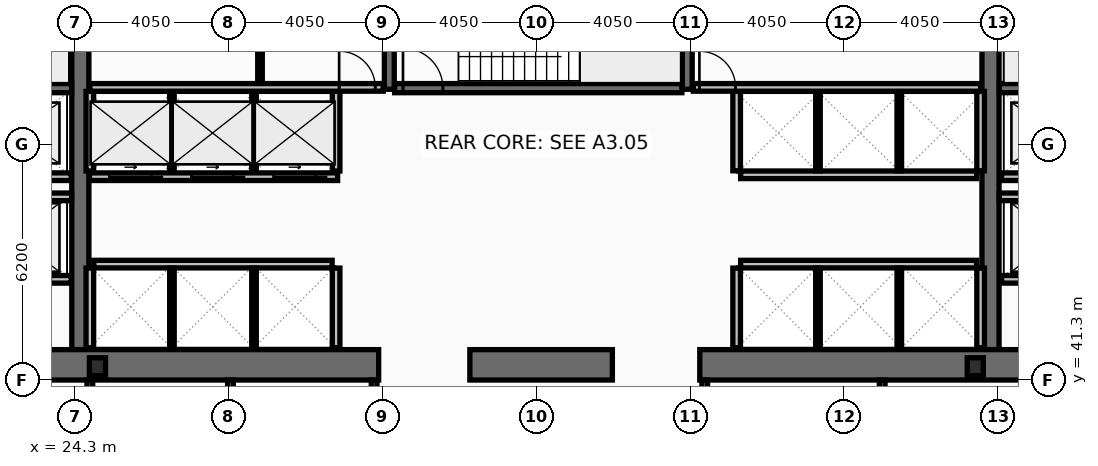
"""IFC4 building model, lengths in metres.
Left out: names, types, materials, properties, quantities, classifications, styles, units other than length and angle.
Written with IfcOpenShell. Run it as: python <this file> out.ifc"""

import sys

from ifc_helpers import new_model, si_unit, direction, frame, frame_2d, origin, origin_2d, place, context, subcontext, project, spatial, rectangle, i_section, extrude, element, fill, save


model = new_model("IFC4")
c1 = context("Model", 3, precision=1e-05, world=origin(), true_north=direction((0.0, 1.0)))
c2 = subcontext(c1, "Body", "Model", "MODEL_VIEW")
j1 = project(units=[si_unit("LENGTHUNIT", "METRE"), si_unit("PLANEANGLEUNIT", "RADIAN")], contexts=[c1])
p1 = place(None, origin())
s1 = spatial("IfcSite", under=j1, at=p1, CompositionType="ELEMENT")
p2 = place(p1, origin())
s2 = spatial("IfcBuilding", under=s1, at=p2, CompositionType="ELEMENT")
p3 = place(p2, frame((0.0, 0.0, 37.8)))
s3 = spatial("IfcBuildingStorey", under=s2, at=p3, CompositionType="ELEMENT", Elevation=37.8)
for number, where, z_axis, x_axis in (
    (1, (24.45, 42.1, 0.0), (0.0, 0.0, 1.0), (0.0, 1.0, 0.0)),
    (2, (48.4, 42.1, 0.0), (0.0, 0.0, 1.0), (0.0, 1.0, 0.0)),
):
    element("IfcWall", number, at=place(p3, frame(where, z_axis=z_axis, x_axis=x_axis)), inside=s3, PredefinedType="SHEAR", context=c2, shape_type="SweptSolid", body=[
        extrude(rectangle(XDim=10.8, YDim=0.45, at=frame_2d((5.4, 0.0))), origin(), (0.0, 0.0, 1.0), 3.82),
    ])
p4 = place(p3, frame((32.3, 41.7, 0.0), z_axis=(0.0, 0.0, 1.0), x_axis=(-1.0, 0.0, 0.0)))
e3 = element("IfcWall", 3, at=p4, inside=s3, PredefinedType="SHEAR", context=c2, shape_type="SweptSolid", body=[
    extrude(rectangle(XDim=11.45, YDim=0.8, at=frame_2d((5.725, 0.0))), origin(), (0.0, 0.0, 1.0), 3.82),
])
p5 = place(p3, frame((38.45, 41.7, 0.0), z_axis=(0.0, 0.0, 1.0), x_axis=(-1.0, 0.0, 0.0)))
e4 = element("IfcWall", 4, at=p5, inside=s3, PredefinedType="SHEAR", context=c2, shape_type="SweptSolid", body=[
    extrude(rectangle(XDim=3.75, YDim=0.8, at=frame_2d((1.875, 0.0))), origin(), (0.0, 0.0, 1.0), 3.82),
])
p6 = place(p3, frame((52.05, 41.7, 0.0), z_axis=(0.0, 0.0, 1.0), x_axis=(-1.0, 0.0, 0.0)))
e5 = element("IfcWall", 5, at=p6, inside=s3, PredefinedType="SHEAR", context=c2, shape_type="SweptSolid", body=[
    extrude(rectangle(XDim=11.3, YDim=0.8, at=frame_2d((5.65, 0.0))), origin(), (0.0, 0.0, 1.0), 3.82),
])
for number, where, z_axis, x_axis in (
    (6, (32.58, 48.95, 0.0), (0.0, 0.0, 1.0), (0.0, 1.0, 0.0)),
    (7, (40.42, 48.95, 0.0), (0.0, 0.0, 1.0), (0.0, 1.0, 0.0)),
):
    element("IfcWall", number, at=place(p3, frame(where, z_axis=z_axis, x_axis=x_axis)), inside=s3, PredefinedType="SHEAR", context=c2, shape_type="SweptSolid", body=[
        extrude(rectangle(XDim=3.95, YDim=0.26, at=frame_2d((1.975, 0.0))), origin(), (0.0, 0.0, 1.0), 3.82),
    ])
p7 = place(p3, frame((17.0, 48.98, 0.0), z_axis=(0.0, 0.0, 1.0), x_axis=(1.0, 0.0, 0.0)))
e8 = element("IfcWall", 8, at=p7, inside=s3, PredefinedType="SHEAR", context=c2, shape_type="SweptSolid", body=[
    extrude(rectangle(XDim=7.22, YDim=0.24, at=frame_2d((3.61, 0.0))), origin(), (0.0, 0.0, 1.0), 3.82),
])
p8 = place(p7, frame((0.22, 0.0, 0.0)))
e9 = element("IfcOpeningElement", 9, at=p8, cuts=e8, PredefinedType="OPENING", context=c2, shape_type="SweptSolid", body=[
    extrude(rectangle(XDim=1.05, YDim=2.15, at=frame_2d((0.525, 1.075))), frame((0.0, 0.13, 0.0), z_axis=(0.0, -1.0, 0.0), x_axis=(1.0, 0.0, 0.0)), (0.0, 0.0, 1.0), 0.26),
])
p9 = place(p3, frame((48.63, 48.98, 0.0), z_axis=(0.0, 0.0, 1.0), x_axis=(1.0, 0.0, 0.0)))
e10 = element("IfcWall", 10, at=p9, inside=s3, PredefinedType="SHEAR", context=c2, shape_type="SweptSolid", body=[
    extrude(rectangle(XDim=7.27, YDim=0.24, at=frame_2d((3.635, 0.0))), origin(), (0.0, 0.0, 1.0), 3.82),
])
p10 = place(p9, frame((6.0, 0.0, 0.0)))
e11 = element("IfcOpeningElement", 11, at=p10, cuts=e10, PredefinedType="OPENING", context=c2, shape_type="SweptSolid", body=[
    extrude(rectangle(XDim=1.05, YDim=2.15, at=frame_2d((0.525, 1.075))), frame((0.0, 0.13, 0.0), z_axis=(0.0, -1.0, 0.0), x_axis=(1.0, 0.0, 0.0)), (0.0, 0.0, 1.0), 0.26),
])
p11 = place(p3, frame((32.72, 48.98, 0.0), z_axis=(0.0, 0.0, 1.0), x_axis=(1.0, 0.0, 0.0)))
e12 = element("IfcWall", 12, at=p11, inside=s3, PredefinedType="SHEAR", context=c2, shape_type="SweptSolid", body=[
    extrude(rectangle(XDim=7.56, YDim=0.24, at=frame_2d((3.78, 0.0))), origin(), (0.0, 0.0, 1.0), 3.82),
])
p12 = place(p11, frame((0.22, 0.0, 0.0)))
e13 = element("IfcOpeningElement", 13, at=p12, cuts=e12, PredefinedType="OPENING", context=c2, shape_type="SweptSolid", body=[
    extrude(rectangle(XDim=1.05, YDim=2.15, at=frame_2d((0.525, 1.075))), frame((0.0, 0.13, 0.0), z_axis=(0.0, -1.0, 0.0), x_axis=(1.0, 0.0, 0.0)), (0.0, 0.0, 1.0), 0.26),
])
for number, where, z_axis, x_axis in (
    (14, (24.9, 41.65, 0.0), (0.0, 0.0, 1.0), (1.0, 0.0, 0.0)),
    (15, (48.0, 41.65, 0.0), (0.0, 0.0, 1.0), (1.0, 0.0, 0.0)),
):
    element("IfcColumn", number, at=place(p3, frame(where, z_axis=z_axis, x_axis=x_axis)), inside=s3, PredefinedType="COLUMN", context=c2, shape_type="SweptSolid", body=[
        extrude(i_section(OverallWidth=0.424, OverallDepth=0.474, WebThickness=0.048, FlangeThickness=0.077, at=origin_2d()), origin(), (0.0, 0.0, 1.0), 4.0),
    ])
p13 = place(p3, frame((51.61, 43.95, 0.0), z_axis=(0.0, 0.0, 1.0), x_axis=(-1.0, 0.0, 0.0)))
e16 = element("IfcWall", 16, at=p13, inside=s3, PredefinedType="PARTITIONING", context=c2, shape_type="SweptSolid", body=[
    extrude(rectangle(XDim=2.92, YDim=0.2, at=frame_2d((1.46, 0.0))), origin(), (0.0, 0.0, 1.0), 3.82),
])
p14 = place(p13, frame((0.81, 0.0, 0.0)))
e17 = element("IfcOpeningElement", 17, at=p14, cuts=e16, PredefinedType="OPENING", context=c2, shape_type="SweptSolid", body=[
    extrude(rectangle(XDim=1.3, YDim=2.18, at=frame_2d((0.65, 1.09))), frame((0.0, 0.11, 0.0), z_axis=(0.0, -1.0, 0.0), x_axis=(1.0, 0.0, 0.0)), (0.0, 0.0, 1.0), 0.22),
])
p15 = place(p3, frame((24.21, 43.95, 0.0), z_axis=(0.0, 0.0, 1.0), x_axis=(-1.0, 0.0, 0.0)))
e18 = element("IfcWall", 18, at=p15, inside=s3, PredefinedType="PARTITIONING", context=c2, shape_type="SweptSolid", body=[
    extrude(rectangle(XDim=2.97, YDim=0.2, at=frame_2d((1.485, 0.0))), origin(), (0.0, 0.0, 1.0), 3.82),
])
p16 = place(p15, frame((0.86, 0.0, 0.0)))
e19 = element("IfcOpeningElement", 19, at=p16, cuts=e18, PredefinedType="OPENING", context=c2, shape_type="SweptSolid", body=[
    extrude(rectangle(XDim=1.3, YDim=2.18, at=frame_2d((0.65, 1.09))), frame((0.0, 0.11, 0.0), z_axis=(0.0, -1.0, 0.0), x_axis=(1.0, 0.0, 0.0)), (0.0, 0.0, 1.0), 0.22),
])
p17 = place(p3, frame((51.61, 46.65, 0.0), z_axis=(0.0, 0.0, 1.0), x_axis=(-1.0, 0.0, 0.0)))
e20 = element("IfcWall", 20, at=p17, inside=s3, PredefinedType="PARTITIONING", context=c2, shape_type="SweptSolid", body=[
    extrude(rectangle(XDim=2.92, YDim=0.2, at=frame_2d((1.46, 0.0))), origin(), (0.0, 0.0, 1.0), 3.82),
])
p18 = place(p17, frame((0.86, 0.0, 0.0)))
e21 = element("IfcOpeningElement", 21, at=p18, cuts=e20, PredefinedType="OPENING", context=c2, shape_type="SweptSolid", body=[
    extrude(rectangle(XDim=1.2, YDim=2.18, at=frame_2d((0.6, 1.09))), frame((0.0, 0.11, 0.0), z_axis=(0.0, -1.0, 0.0), x_axis=(1.0, 0.0, 0.0)), (0.0, 0.0, 1.0), 0.22),
])
p19 = place(p3, frame((24.21, 46.65, 0.0), z_axis=(0.0, 0.0, 1.0), x_axis=(-1.0, 0.0, 0.0)))
e22 = element("IfcWall", 22, at=p19, inside=s3, PredefinedType="PARTITIONING", context=c2, shape_type="SweptSolid", body=[
    extrude(rectangle(XDim=2.97, YDim=0.2, at=frame_2d((1.485, 0.0))), origin(), (0.0, 0.0, 1.0), 3.82),
])
p20 = place(p19, frame((0.91, 0.0, 0.0)))
e23 = element("IfcOpeningElement", 23, at=p20, cuts=e22, PredefinedType="OPENING", context=c2, shape_type="SweptSolid", body=[
    extrude(rectangle(XDim=1.2, YDim=2.18, at=frame_2d((0.6, 1.09))), frame((0.0, 0.11, 0.0), z_axis=(0.0, -1.0, 0.0), x_axis=(1.0, 0.0, 0.0)), (0.0, 0.0, 1.0), 0.22),
])
p21 = place(p3, frame((31.22, 46.65, 0.0), z_axis=(0.0, 0.0, 1.0), x_axis=(-1.0, 0.0, 0.0)))
e24 = element("IfcWall", 24, at=p21, inside=s3, PredefinedType="PARTITIONING", context=c2, shape_type="SweptSolid", body=[
    extrude(rectangle(XDim=6.53, YDim=0.2, at=frame_2d((3.265, 0.0))), origin(), (0.0, 0.0, 1.0), 3.82),
])
p22 = place(p21, frame((4.9, 0.0, 0.0)))
e25 = element("IfcOpeningElement", 25, at=p22, cuts=e24, PredefinedType="OPENING", context=c2, shape_type="SweptSolid", body=[
    extrude(rectangle(XDim=1.1, YDim=2.18, at=frame_2d((0.55, 1.09))), frame((0.0, 0.11, 0.0), z_axis=(0.0, -1.0, 0.0), x_axis=(1.0, 0.0, 0.0)), (0.0, 0.0, 1.0), 0.22),
])
p23 = place(p21, frame((2.74, 0.0, 0.0)))
e26 = element("IfcOpeningElement", 26, at=p23, cuts=e24, PredefinedType="OPENING", context=c2, shape_type="SweptSolid", body=[
    extrude(rectangle(XDim=1.1, YDim=2.18, at=frame_2d((0.55, 1.09))), frame((0.0, 0.11, 0.0), z_axis=(0.0, -1.0, 0.0), x_axis=(1.0, 0.0, 0.0)), (0.0, 0.0, 1.0), 0.22),
])
p24 = place(p21, frame((0.58, 0.0, 0.0)))
e27 = element("IfcOpeningElement", 27, at=p24, cuts=e24, PredefinedType="OPENING", context=c2, shape_type="SweptSolid", body=[
    extrude(rectangle(XDim=1.1, YDim=2.18, at=frame_2d((0.55, 1.09))), frame((0.0, 0.11, 0.0), z_axis=(0.0, -1.0, 0.0), x_axis=(1.0, 0.0, 0.0)), (0.0, 0.0, 1.0), 0.22),
])
p25 = place(p3, frame((21.2, 46.12, 0.0), z_axis=(0.0, 0.0, 1.0), x_axis=(1.0, 0.0, 0.0)))
e28 = element("IfcWall", 28, at=p25, inside=s3, PredefinedType="PARTITIONING", context=c2, shape_type="SweptSolid", body=[
    extrude(rectangle(XDim=3.02, YDim=0.2, at=frame_2d((1.51, 0.0))), origin(), (0.0, 0.0, 1.0), 3.82),
])
p26 = place(p3, frame((48.63, 46.12, 0.0), z_axis=(0.0, 0.0, 1.0), x_axis=(1.0, 0.0, 0.0)))
e29 = element("IfcWall", 29, at=p26, inside=s3, PredefinedType="PARTITIONING", context=c2, shape_type="SweptSolid", body=[
    extrude(rectangle(XDim=3.07, YDim=0.2, at=frame_2d((1.535, 0.0))), origin(), (0.0, 0.0, 1.0), 3.82),
])
for number, where, z_axis, x_axis in (
    (30, (24.7, 46.8, 0.0), (0.0, 0.0, 1.0), (0.0, 1.0, 0.0)),
    (31, (31.18, 46.8, 0.0), (0.0, 0.0, 1.0), (0.0, 1.0, 0.0)),
):
    element("IfcWall", number, at=place(p3, frame(where, z_axis=z_axis, x_axis=x_axis)), inside=s3, PredefinedType="PARTITIONING", context=c2, shape_type="SweptSolid", body=[
        extrude(rectangle(XDim=2.095, YDim=0.2, at=frame_2d((1.047, 0.0))), origin(), (0.0, 0.0, 1.0), 3.82),
    ])
for number, where, z_axis, x_axis in (
    (32, (26.86, 46.8, 0.0), (0.0, 0.0, 1.0), (0.0, 1.0, 0.0)),
    (33, (29.02, 46.8, 0.0), (0.0, 0.0, 1.0), (0.0, 1.0, 0.0)),
):
    element("IfcWall", number, at=place(p3, frame(where, z_axis=z_axis, x_axis=x_axis)), inside=s3, PredefinedType="PARTITIONING", context=c2, shape_type="SweptSolid", body=[
        extrude(rectangle(XDim=2.095, YDim=0.12, at=frame_2d((1.047, 0.0))), origin(), (0.0, 0.0, 1.0), 3.82),
    ])
p27 = place(p3, frame((24.805, 44.35, 0.0), z_axis=(0.0, 0.0, 1.0), x_axis=(1.0, 0.0, 0.0)))
e34 = element("IfcWall", 34, at=p27, inside=s3, PredefinedType="PARTITIONING", context=c2, shape_type="SweptSolid", body=[
    extrude(rectangle(XDim=6.27, YDim=0.2, at=frame_2d((3.135, 0.0))), origin(), (0.0, 0.0, 1.0), 3.82),
])
for number, where, z_axis, x_axis in (
    (35, (24.7, 42.15, 0.0), (0.0, 0.0, 1.0), (0.0, 1.0, 0.0)),
    (36, (31.18, 42.15, 0.0), (0.0, 0.0, 1.0), (0.0, 1.0, 0.0)),
):
    element("IfcWall", number, at=place(p3, frame(where, z_axis=z_axis, x_axis=x_axis)), inside=s3, PredefinedType="PARTITIONING", context=c2, shape_type="SweptSolid", body=[
        extrude(rectangle(XDim=2.095, YDim=0.2, at=frame_2d((1.048, 0.0))), origin(), (0.0, 0.0, 1.0), 3.82),
    ])
for number, where, z_axis, x_axis in (
    (37, (26.86, 42.15, 0.0), (0.0, 0.0, 1.0), (0.0, 1.0, 0.0)),
    (38, (29.02, 42.15, 0.0), (0.0, 0.0, 1.0), (0.0, 1.0, 0.0)),
):
    element("IfcWall", number, at=place(p3, frame(where, z_axis=z_axis, x_axis=x_axis)), inside=s3, PredefinedType="PARTITIONING", context=c2, shape_type="SweptSolid", body=[
        extrude(rectangle(XDim=2.095, YDim=0.12, at=frame_2d((1.048, 0.0))), origin(), (0.0, 0.0, 1.0), 3.82),
    ])
p28 = place(p3, frame((41.825, 46.7, 0.0), z_axis=(0.0, 0.0, 1.0), x_axis=(1.0, 0.0, 0.0)))
e39 = element("IfcWall", 39, at=p28, inside=s3, PredefinedType="PARTITIONING", context=c2, shape_type="SweptSolid", body=[
    extrude(rectangle(XDim=6.21, YDim=0.2, at=frame_2d((3.105, 0.0))), origin(), (0.0, 0.0, 1.0), 3.82),
])
for number, where, z_axis, x_axis in (
    (40, (41.72, 46.805, 0.0), (0.0, 0.0, 1.0), (0.0, 1.0, 0.0)),
    (41, (48.14, 46.805, 0.0), (0.0, 0.0, 1.0), (0.0, 1.0, 0.0)),
):
    element("IfcWall", number, at=place(p3, frame(where, z_axis=z_axis, x_axis=x_axis)), inside=s3, PredefinedType="PARTITIONING", context=c2, shape_type="SweptSolid", body=[
        extrude(rectangle(XDim=2.09, YDim=0.2, at=frame_2d((1.045, 0.0))), origin(), (0.0, 0.0, 1.0), 3.82),
    ])
for number, where, z_axis, x_axis in (
    (42, (43.86, 46.805, 0.0), (0.0, 0.0, 1.0), (0.0, 1.0, 0.0)),
    (43, (46.0, 46.805, 0.0), (0.0, 0.0, 1.0), (0.0, 1.0, 0.0)),
):
    element("IfcWall", number, at=place(p3, frame(where, z_axis=z_axis, x_axis=x_axis)), inside=s3, PredefinedType="PARTITIONING", context=c2, shape_type="SweptSolid", body=[
        extrude(rectangle(XDim=2.09, YDim=0.12, at=frame_2d((1.045, 0.0))), origin(), (0.0, 0.0, 1.0), 3.82),
    ])
p29 = place(p3, frame((41.825, 44.35, 0.0), z_axis=(0.0, 0.0, 1.0), x_axis=(1.0, 0.0, 0.0)))
e44 = element("IfcWall", 44, at=p29, inside=s3, PredefinedType="PARTITIONING", context=c2, shape_type="SweptSolid", body=[
    extrude(rectangle(XDim=6.21, YDim=0.2, at=frame_2d((3.105, 0.0))), origin(), (0.0, 0.0, 1.0), 3.82),
])
for number, where, z_axis, x_axis in (
    (45, (41.72, 42.15, 0.0), (0.0, 0.0, 1.0), (0.0, 1.0, 0.0)),
    (46, (48.14, 42.15, 0.0), (0.0, 0.0, 1.0), (0.0, 1.0, 0.0)),
):
    element("IfcWall", number, at=place(p3, frame(where, z_axis=z_axis, x_axis=x_axis)), inside=s3, PredefinedType="PARTITIONING", context=c2, shape_type="SweptSolid", body=[
        extrude(rectangle(XDim=2.095, YDim=0.2, at=frame_2d((1.048, 0.0))), origin(), (0.0, 0.0, 1.0), 3.82),
    ])
for number, where, z_axis, x_axis in (
    (47, (43.86, 42.15, 0.0), (0.0, 0.0, 1.0), (0.0, 1.0, 0.0)),
    (48, (46.0, 42.15, 0.0), (0.0, 0.0, 1.0), (0.0, 1.0, 0.0)),
):
    element("IfcWall", number, at=place(p3, frame(where, z_axis=z_axis, x_axis=x_axis)), inside=s3, PredefinedType="PARTITIONING", context=c2, shape_type="SweptSolid", body=[
        extrude(rectangle(XDim=2.095, YDim=0.12, at=frame_2d((1.048, 0.0))), origin(), (0.0, 0.0, 1.0), 3.82),
    ])
p30 = place(p3, frame((24.7, 49.0, 0.0), z_axis=(0.0, 0.0, 1.0), x_axis=(1.0, 0.0, 0.0)))
e49 = element("IfcWall", 49, at=p30, inside=s3, PredefinedType="PARTITIONING", context=c2, shape_type="SweptSolid", body=[
    extrude(rectangle(XDim=7.72, YDim=0.2, at=frame_2d((3.86, 0.0))), origin(), (0.0, 0.0, 1.0), 3.82),
])
p31 = place(p30, frame((6.56, 0.0, 0.0)))
e50 = element("IfcOpeningElement", 50, at=p31, cuts=e49, PredefinedType="OPENING", context=c2, shape_type="SweptSolid", body=[
    extrude(rectangle(XDim=0.95, YDim=2.1, at=frame_2d((0.475, 1.05))), frame((0.0, 0.11, 0.0), z_axis=(0.0, -1.0, 0.0), x_axis=(1.0, 0.0, 0.0)), (0.0, 0.0, 1.0), 0.22),
])
p32 = place(p3, frame((29.177, 49.105, 0.0), z_axis=(0.0, 0.0, 1.0), x_axis=(0.0, 1.0, 0.0)))
e51 = element("IfcWall", 51, at=p32, inside=s3, PredefinedType="PARTITIONING", context=c2, shape_type="SweptSolid", body=[
    extrude(rectangle(XDim=3.69, YDim=0.12, at=frame_2d((1.845, 0.0))), origin(), (0.0, 0.0, 1.0), 3.82),
])
p33 = place(p32, frame((1.05, 0.0, 0.0)))
e52 = element("IfcOpeningElement", 52, at=p33, cuts=e51, PredefinedType="OPENING", context=c2, shape_type="SweptSolid", body=[
    extrude(rectangle(XDim=0.9, YDim=2.05, at=frame_2d((0.45, 1.025))), frame((0.0, 0.07, 0.0), z_axis=(0.0, -1.0, 0.0), x_axis=(1.0, 0.0, 0.0)), (0.0, 0.0, 1.0), 0.14),
])
p34 = place(p3, frame((40.58, 49.0, 0.0), z_axis=(0.0, 0.0, 1.0), x_axis=(1.0, 0.0, 0.0)))
e53 = element("IfcWall", 53, at=p34, inside=s3, PredefinedType="PARTITIONING", context=c2, shape_type="SweptSolid", body=[
    extrude(rectangle(XDim=7.56, YDim=0.2, at=frame_2d((3.78, 0.0))), origin(), (0.0, 0.0, 1.0), 3.82),
])
p35 = place(p34, frame((0.16, 0.0, 0.0)))
e54 = element("IfcOpeningElement", 54, at=p35, cuts=e53, PredefinedType="OPENING", context=c2, shape_type="SweptSolid", body=[
    extrude(rectangle(XDim=0.95, YDim=2.1, at=frame_2d((0.475, 1.05))), frame((0.0, 0.11, 0.0), z_axis=(0.0, -1.0, 0.0), x_axis=(1.0, 0.0, 0.0)), (0.0, 0.0, 1.0), 0.22),
])
p36 = place(p3, frame((24.7, 38.28, 0.0), z_axis=(0.0, 0.0, 1.0), x_axis=(0.0, 1.0, 0.0)))
e55 = element("IfcWall", 55, at=p36, inside=s3, PredefinedType="PARTITIONING", context=c2, shape_type="SweptSolid", body=[
    extrude(rectangle(XDim=3.02, YDim=0.15, at=frame_2d((1.51, 0.0))), origin(), (0.0, 0.0, 1.0), 3.01),
])
for number, where, z_axis, x_axis in (
    (56, (28.4, 38.28, 0.0), (0.0, 0.0, 1.0), (0.0, 1.0, 0.0)),
    (57, (32.18, 38.28, 0.0), (0.0, 0.0, 1.0), (0.0, 1.0, 0.0)),
    (58, (40.88, 38.28, 0.0), (0.0, 0.0, 1.0), (0.0, 1.0, 0.0)),
    (59, (45.55, 38.28, 0.0), (0.0, 0.0, 1.0), (0.0, 1.0, 0.0)),
):
    element("IfcWall", number, at=place(p3, frame(where, z_axis=z_axis, x_axis=x_axis)), inside=s3, PredefinedType="PARTITIONING", context=c2, shape_type="SweptSolid", body=[
        extrude(rectangle(XDim=3.02, YDim=0.15, at=frame_2d((1.51, 0.0))), origin(), (0.0, 0.0, 1.0), 3.82),
    ])
p37 = place(p12, origin())
e60 = element("IfcDoor", 60, at=p37, inside=s3, OperationType="SINGLE_SWING_LEFT", PredefinedType="DOOR", context=c2, shape_type="SweptSolid", body=[
    extrude(rectangle(XDim=1.05, YDim=2.15, at=frame_2d((0.525, 1.075))), frame((0.0, 0.025, 0.0), z_axis=(0.0, -1.0, 0.0), x_axis=(1.0, 0.0, 0.0)), (0.0, 0.0, 1.0), 0.05),
])
fill(e13, e60)
p38 = place(p22, origin())
e61 = element("IfcDoor", 61, at=p38, inside=s3, OperationType="SLIDING_TO_LEFT", PredefinedType="DOOR", context=c2, shape_type="SweptSolid", body=[
    extrude(rectangle(XDim=1.1, YDim=2.18, at=frame_2d((0.55, 1.09))), frame((0.0, 0.025, 0.0), z_axis=(0.0, -1.0, 0.0), x_axis=(1.0, 0.0, 0.0)), (0.0, 0.0, 1.0), 0.05),
])
fill(e25, e61)
p39 = place(p23, origin())
e62 = element("IfcDoor", 62, at=p39, inside=s3, OperationType="SLIDING_TO_LEFT", PredefinedType="DOOR", context=c2, shape_type="SweptSolid", body=[
    extrude(rectangle(XDim=1.1, YDim=2.18, at=frame_2d((0.55, 1.09))), frame((0.0, 0.025, 0.0), z_axis=(0.0, -1.0, 0.0), x_axis=(1.0, 0.0, 0.0)), (0.0, 0.0, 1.0), 0.05),
])
fill(e26, e62)
p40 = place(p24, origin())
e63 = element("IfcDoor", 63, at=p40, inside=s3, OperationType="SLIDING_TO_LEFT", PredefinedType="DOOR", context=c2, shape_type="SweptSolid", body=[
    extrude(rectangle(XDim=1.1, YDim=2.18, at=frame_2d((0.55, 1.09))), frame((0.0, 0.025, 0.0), z_axis=(0.0, -1.0, 0.0), x_axis=(1.0, 0.0, 0.0)), (0.0, 0.0, 1.0), 0.05),
])
fill(e27, e63)
p41 = place(p31, origin())
e64 = element("IfcDoor", 64, at=p41, inside=s3, OperationType="SINGLE_SWING_LEFT", PredefinedType="DOOR", context=c2, shape_type="SweptSolid", body=[
    extrude(rectangle(XDim=0.95, YDim=2.1, at=frame_2d((0.475, 1.05))), frame((0.0, 0.025, 0.0), z_axis=(0.0, -1.0, 0.0), x_axis=(1.0, 0.0, 0.0)), (0.0, 0.0, 1.0), 0.05),
])
fill(e50, e64)
p42 = place(p35, origin())
e65 = element("IfcDoor", 65, at=p42, inside=s3, OperationType="SINGLE_SWING_LEFT", PredefinedType="DOOR", context=c2, shape_type="SweptSolid", body=[
    extrude(rectangle(XDim=0.95, YDim=2.1, at=frame_2d((0.475, 1.05))), frame((0.0, 0.025, 0.0), z_axis=(0.0, -1.0, 0.0), x_axis=(1.0, 0.0, 0.0)), (0.0, 0.0, 1.0), 0.05),
])
fill(e54, e65)
save(model, sys.argv[1])
